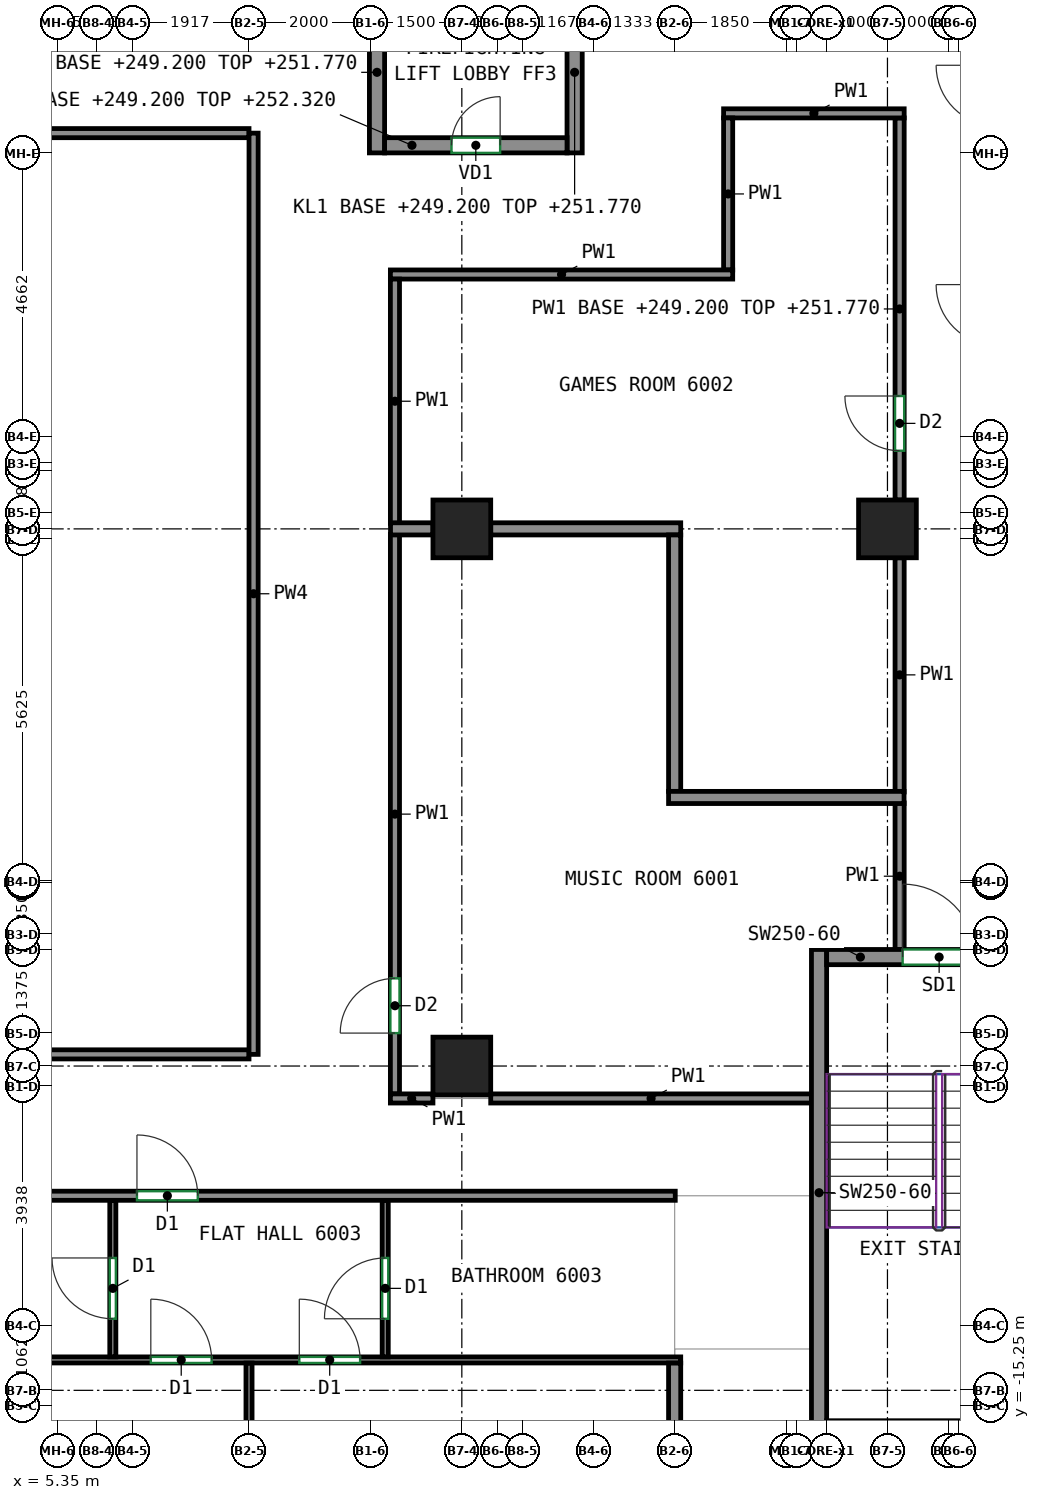
"""IFC4 building model, lengths in metres.
Left out: names, types, materials, properties, quantities, classifications, styles, units other than length and angle.
Written with IfcOpenShell. Run it as: python <this file> out.ifc"""

import sys

from ifc_helpers import new_model, si_unit, direction, frame, frame_2d, origin, origin_2d, place, context, subcontext, project, spatial, rectangle, extrude, source, transform, mapped, element, fill, save


model = new_model("IFC4")
c1 = context("Model", 3, precision=1e-05, world=origin(), true_north=direction((0.0, 1.0)))
c2 = subcontext(c1, "Body", "Model", "MODEL_VIEW")
j1 = project(units=[si_unit("LENGTHUNIT", "METRE"), si_unit("PLANEANGLEUNIT", "RADIAN")], contexts=[c1])
p1 = place(None, origin())
s1 = spatial("IfcSite", under=j1, at=p1, CompositionType="ELEMENT")
p2 = place(p1, origin())
s2 = spatial("IfcBuilding", under=s1, at=p2, CompositionType="ELEMENT")
p3 = place(p2, frame((0.0, 0.0, 249.2)))
s3 = spatial("IfcBuildingStorey", under=s2, at=p3, CompositionType="ELEMENT", Elevation=249.2)
m1 = source(origin(), c2, "Body", "SweptSolid", [
    extrude(rectangle(XDim=0.95, YDim=0.95, at=origin_2d()), origin(), (0.0, 0.0, 1.0), 3.12),
])
for number, where, z_axis, x_axis in (
    (1, (12.0, -9.667, 0.0), (0.0, 0.0, 1.0), (1.0, 0.0, 0.0)),
    (2, (12.0, -0.833, 0.0), (0.0, 0.0, 1.0), (1.0, 0.0, 0.0)),
    (3, (19.0, -0.833, 0.0), (0.0, 0.0, 1.0), (1.0, 0.0, 0.0)),
):
    element("IfcColumn", number, at=place(p3, frame(where, z_axis=z_axis, x_axis=x_axis)), inside=s3, PredefinedType="COLUMN", context=c2, shape_type="MappedRepresentation", body=[
        mapped(m1, transform((0.0, 0.0, 0.0))),
    ])
m2 = source(origin(), c2, "Body", "SweptSolid", [
    extrude(rectangle(XDim=8.0, YDim=0.25, at=frame_2d((4.0, 0.0))), origin(), (0.0, 0.0, 1.0), 3.12),
])
p4 = place(p3, frame((17.875, -15.75, 0.0), z_axis=(0.0, 0.0, 1.0), x_axis=(0.0, 1.0, 0.0)))
e4 = element("IfcWall", 4, at=p4, inside=s3, PredefinedType="SHEAR", context=c2, shape_type="MappedRepresentation", body=[
    mapped(m2, transform((0.0, 0.0, 0.0))),
])
m3 = source(origin(), c2, "Body", "SweptSolid", [
    extrude(rectangle(XDim=3.7, YDim=0.25, at=frame_2d((1.85, 0.0))), origin(), (0.0, 0.0, 1.0), 3.12),
])
p5 = place(p3, frame((18.0, -7.875, 0.0), z_axis=(0.0, 0.0, 1.0), x_axis=(1.0, 0.0, 0.0)))
e5 = element("IfcWall", 5, at=p5, inside=s3, PredefinedType="SHEAR", context=c2, shape_type="MappedRepresentation", body=[
    mapped(m3, transform((0.0, 0.0, 0.0))),
])
p6 = place(p5, frame((1.25, 0.0, 0.0)))
e6 = element("IfcOpeningElement", 6, at=p6, cuts=e5, PredefinedType="OPENING", context=c2, shape_type="SweptSolid", body=[
    extrude(rectangle(XDim=1.2, YDim=2.1, at=frame_2d((0.6, 1.05))), frame((0.0, 0.135, 0.0), z_axis=(0.0, -1.0, 0.0), x_axis=(1.0, 0.0, 0.0)), (0.0, 0.0, 1.0), 0.27),
])
m4 = source(origin(), c2, "Body", "SweptSolid", [
    extrude(rectangle(XDim=2.65, YDim=0.25, at=frame_2d((1.325, 0.0))), origin(), (0.0, 0.0, 1.0), 2.57),
])
for number, where, z_axis, x_axis in (
    (7, (10.605, 5.35, 0.0), (0.0, 0.0, 1.0), (0.0, 1.0, 0.0)),
    (8, (13.855, 5.35, 0.0), (0.0, 0.0, 1.0), (0.0, 1.0, 0.0)),
):
    element("IfcWall", number, at=place(p3, frame(where, z_axis=z_axis, x_axis=x_axis)), inside=s3, PredefinedType="PARTITIONING", context=c2, shape_type="MappedRepresentation", body=[
        mapped(m4, transform((0.0, 0.0, 0.0))),
    ])
m5 = source(origin(), c2, "Body", "SweptSolid", [
    extrude(rectangle(XDim=3.0, YDim=0.25, at=frame_2d((1.5, 0.0))), origin(), (0.0, 0.0, 1.0), 3.12),
])
p7 = place(p3, frame((10.73, 5.475, 0.0), z_axis=(0.0, 0.0, 1.0), x_axis=(1.0, 0.0, 0.0)))
e9 = element("IfcWall", 9, at=p7, inside=s3, PredefinedType="PARTITIONING", context=c2, shape_type="MappedRepresentation", body=[
    mapped(m5, transform((0.0, 0.0, 0.0))),
])
p8 = place(p7, frame((1.1, 0.0, 0.0)))
e10 = element("IfcOpeningElement", 10, at=p8, cuts=e9, PredefinedType="OPENING", context=c2, shape_type="SweptSolid", body=[
    extrude(rectangle(XDim=0.8, YDim=2.0, at=frame_2d((0.4, 1.0))), frame((0.0, 0.135, 0.0), z_axis=(0.0, -1.0, 0.0), x_axis=(1.0, 0.0, 0.0)), (0.0, 0.0, 1.0), 0.27),
])
p9 = place(p3, frame((-11.8, -11.8, 0.0), z_axis=(0.0, 0.0, 1.0), x_axis=(1.0, 0.0, 0.0)))
e11 = element("IfcWall", 11, at=p9, inside=s3, PredefinedType="PARTITIONING", context=c2, shape_type="SweptSolid", body=[
    extrude(rectangle(XDim=27.31, YDim=0.15, at=frame_2d((13.655, 0.0))), origin(), (0.0, 0.0, 1.0), 3.12),
])
p10 = place(p9, frame((5.021, 0.0, 0.0)))
e12 = element("IfcOpeningElement", 12, at=p10, cuts=e11, PredefinedType="OPENING", context=c2, shape_type="SweptSolid", body=[
    extrude(rectangle(XDim=1.0, YDim=2.1, at=frame_2d((0.5, 1.05))), frame((0.0, 0.085, 0.0), z_axis=(0.0, -1.0, 0.0), x_axis=(1.0, 0.0, 0.0)), (0.0, 0.0, 1.0), 0.17),
])
p11 = place(p9, frame((18.457, 0.0, 0.0)))
e13 = element("IfcOpeningElement", 13, at=p11, cuts=e11, PredefinedType="OPENING", context=c2, shape_type="SweptSolid", body=[
    extrude(rectangle(XDim=1.0, YDim=2.1, at=frame_2d((0.5, 1.05))), frame((0.0, 0.085, 0.0), z_axis=(0.0, -1.0, 0.0), x_axis=(1.0, 0.0, 0.0)), (0.0, 0.0, 1.0), 0.17),
])
p12 = place(p3, frame((19.2, -7.75, 0.0), z_axis=(0.0, 0.0, 1.0), x_axis=(0.0, 1.0, 0.0)))
e14 = element("IfcWall", 14, at=p12, inside=s3, PredefinedType="PARTITIONING", context=c2, shape_type="SweptSolid", body=[
    extrude(rectangle(XDim=2.41, YDim=0.15, at=frame_2d((1.205, 0.0))), origin(), (0.0, 0.0, 1.0), 3.12),
])
p13 = place(p3, frame((10.9, -10.125, 0.0), z_axis=(0.0, 0.0, 1.0), x_axis=(0.0, 1.0, 0.0)))
e15 = element("IfcWall", 15, at=p13, inside=s3, PredefinedType="PARTITIONING", context=c2, shape_type="SweptSolid", body=[
    extrude(rectangle(XDim=9.202, YDim=0.15, at=frame_2d((4.601, 0.0))), origin(), (0.0, 0.0, 1.0), 3.12),
])
p14 = place(p13, frame((1.0, 0.0, 0.0)))
e16 = element("IfcOpeningElement", 16, at=p14, cuts=e15, PredefinedType="OPENING", context=c2, shape_type="SweptSolid", body=[
    extrude(rectangle(XDim=0.9, YDim=2.1, at=frame_2d((0.45, 1.05))), frame((0.0, 0.085, 0.0), z_axis=(0.0, -1.0, 0.0), x_axis=(1.0, 0.0, 0.0)), (0.0, 0.0, 1.0), 0.17),
])
p15 = place(p3, frame((12.475, -10.2, 0.0), z_axis=(0.0, 0.0, 1.0), x_axis=(1.0, 0.0, 0.0)))
e17 = element("IfcWall", 17, at=p15, inside=s3, PredefinedType="PARTITIONING", context=c2, shape_type="SweptSolid", body=[
    extrude(rectangle(XDim=5.275, YDim=0.15, at=frame_2d((2.637, 0.0))), origin(), (0.0, 0.0, 1.0), 3.12),
])
p16 = place(p3, frame((10.825, -10.2, 0.0), z_axis=(0.0, 0.0, 1.0), x_axis=(1.0, 0.0, 0.0)))
e18 = element("IfcWall", 18, at=p16, inside=s3, PredefinedType="PARTITIONING", context=c2, shape_type="SweptSolid", body=[
    extrude(rectangle(XDim=0.7, YDim=0.15, at=frame_2d((0.35, 0.0))), origin(), (0.0, 0.0, 1.0), 3.12),
])
p17 = place(p3, frame((19.2, -5.16, 0.0), z_axis=(0.0, 0.0, 1.0), x_axis=(0.0, 1.0, 0.0)))
e19 = element("IfcWall", 19, at=p17, inside=s3, PredefinedType="PARTITIONING", context=c2, shape_type="SweptSolid", body=[
    extrude(rectangle(XDim=3.852, YDim=0.15, at=frame_2d((1.926, 0.0))), origin(), (0.0, 0.0, 1.0), 3.12),
])
p18 = place(p3, frame((19.2, -0.358, 0.0), z_axis=(0.0, 0.0, 1.0), x_axis=(0.0, 1.0, 0.0)))
e20 = element("IfcWall", 20, at=p18, inside=s3, PredefinedType="PARTITIONING", context=c2, shape_type="SweptSolid", body=[
    extrude(rectangle(XDim=6.283, YDim=0.15, at=frame_2d((3.142, 0.0))), origin(), (0.0, 0.0, 1.0), 2.57),
])
p19 = place(p18, frame((0.81, 0.0, 0.0)))
e21 = element("IfcOpeningElement", 21, at=p19, cuts=e20, PredefinedType="OPENING", context=c2, shape_type="SweptSolid", body=[
    extrude(rectangle(XDim=0.9, YDim=2.1, at=frame_2d((0.45, 1.05))), frame((0.0, 0.085, 0.0), z_axis=(0.0, -1.0, 0.0), x_axis=(1.0, 0.0, 0.0)), (0.0, 0.0, 1.0), 0.17),
])
p20 = place(p3, frame((16.305, 6.0, 0.0), z_axis=(0.0, 0.0, 1.0), x_axis=(1.0, 0.0, 0.0)))
e22 = element("IfcWall", 22, at=p20, inside=s3, PredefinedType="PARTITIONING", context=c2, shape_type="SweptSolid", body=[
    extrude(rectangle(XDim=2.97, YDim=0.15, at=frame_2d((1.485, 0.0))), origin(), (0.0, 0.0, 1.0), 3.12),
])
p21 = place(p3, frame((16.38, 3.425, 0.0), z_axis=(0.0, 0.0, 1.0), x_axis=(0.0, 1.0, 0.0)))
e23 = element("IfcWall", 23, at=p21, inside=s3, PredefinedType="PARTITIONING", context=c2, shape_type="SweptSolid", body=[
    extrude(rectangle(XDim=2.5, YDim=0.15, at=frame_2d((1.25, 0.0))), origin(), (0.0, 0.0, 1.0), 3.12),
])
p22 = place(p3, frame((10.825, 3.35, 0.0), z_axis=(0.0, 0.0, 1.0), x_axis=(1.0, 0.0, 0.0)))
e24 = element("IfcWall", 24, at=p22, inside=s3, PredefinedType="PARTITIONING", context=c2, shape_type="SweptSolid", body=[
    extrude(rectangle(XDim=5.63, YDim=0.15, at=frame_2d((2.815, 0.0))), origin(), (0.0, 0.0, 1.0), 3.12),
])
p23 = place(p3, frame((10.9, -0.743, 0.0), z_axis=(0.0, 0.0, 1.0), x_axis=(0.0, 1.0, 0.0)))
e25 = element("IfcWall", 25, at=p23, inside=s3, PredefinedType="PARTITIONING", context=c2, shape_type="SweptSolid", body=[
    extrude(rectangle(XDim=4.018, YDim=0.15, at=frame_2d((2.009, 0.0))), origin(), (0.0, 0.0, 1.0), 3.12),
])
p24 = place(p3, frame((-9.06, -14.5, 0.0), z_axis=(0.0, 0.0, 1.0), x_axis=(1.0, 0.0, 0.0)))
e26 = element("IfcWall", 26, at=p24, inside=s3, PredefinedType="PARTITIONING", context=c2, shape_type="SweptSolid", body=[
    extrude(rectangle(XDim=24.66, YDim=0.1, at=frame_2d((12.33, 0.0))), origin(), (0.0, 0.0, 1.0), 3.12),
])
p25 = place(p24, frame((0.924, 0.0, 0.0)))
e27 = element("IfcOpeningElement", 27, at=p25, cuts=e26, PredefinedType="OPENING", context=c2, shape_type="SweptSolid", body=[
    extrude(rectangle(XDim=1.0, YDim=2.1, at=frame_2d((0.5, 1.05))), frame((0.0, 0.06, 0.0), z_axis=(0.0, -1.0, 0.0), x_axis=(1.0, 0.0, 0.0)), (0.0, 0.0, 1.0), 0.12),
])
p26 = place(p24, frame((15.945, 0.0, 0.0)))
e28 = element("IfcOpeningElement", 28, at=p26, cuts=e26, PredefinedType="OPENING", context=c2, shape_type="SweptSolid", body=[
    extrude(rectangle(XDim=1.0, YDim=2.1, at=frame_2d((0.5, 1.05))), frame((0.0, 0.06, 0.0), z_axis=(0.0, -1.0, 0.0), x_axis=(1.0, 0.0, 0.0)), (0.0, 0.0, 1.0), 0.12),
])
p27 = place(p24, frame((18.387, 0.0, 0.0)))
e29 = element("IfcOpeningElement", 29, at=p27, cuts=e26, PredefinedType="OPENING", context=c2, shape_type="SweptSolid", body=[
    extrude(rectangle(XDim=1.0, YDim=2.1, at=frame_2d((0.5, 1.05))), frame((0.0, 0.06, 0.0), z_axis=(0.0, -1.0, 0.0), x_axis=(1.0, 0.0, 0.0)), (0.0, 0.0, 1.0), 0.12),
])
p28 = place(p3, frame((6.26, -14.45, 0.0), z_axis=(0.0, 0.0, 1.0), x_axis=(0.0, 1.0, 0.0)))
e30 = element("IfcWall", 30, at=p28, inside=s3, PredefinedType="PARTITIONING", context=c2, shape_type="SweptSolid", body=[
    extrude(rectangle(XDim=2.573, YDim=0.1, at=frame_2d((1.287, 0.0))), origin(), (0.0, 0.0, 1.0), 3.12),
])
p29 = place(p28, frame((0.627, 0.0, 0.0)))
e31 = element("IfcOpeningElement", 31, at=p29, cuts=e30, PredefinedType="OPENING", context=c2, shape_type="SweptSolid", body=[
    extrude(rectangle(XDim=1.0, YDim=2.1, at=frame_2d((0.5, 1.05))), frame((0.0, 0.06, 0.0), z_axis=(0.0, -1.0, 0.0), x_axis=(1.0, 0.0, 0.0)), (0.0, 0.0, 1.0), 0.12),
])
p30 = place(p3, frame((10.74, -14.45, 0.0), z_axis=(0.0, 0.0, 1.0), x_axis=(0.0, 1.0, 0.0)))
e32 = element("IfcWall", 32, at=p30, inside=s3, PredefinedType="PARTITIONING", context=c2, shape_type="SweptSolid", body=[
    extrude(rectangle(XDim=2.573, YDim=0.1, at=frame_2d((1.287, 0.0))), origin(), (0.0, 0.0, 1.0), 3.12),
])
p31 = place(p30, frame((0.627, 0.0, 0.0)))
e33 = element("IfcOpeningElement", 33, at=p31, cuts=e32, PredefinedType="OPENING", context=c2, shape_type="SweptSolid", body=[
    extrude(rectangle(XDim=1.0, YDim=2.1, at=frame_2d((0.5, 1.05))), frame((0.0, 0.06, 0.0), z_axis=(0.0, -1.0, 0.0), x_axis=(1.0, 0.0, 0.0)), (0.0, 0.0, 1.0), 0.12),
])
p32 = place(p3, frame((8.5, -18.25, 0.0), z_axis=(0.0, 0.0, 1.0), x_axis=(0.0, 1.0, 0.0)))
e34 = element("IfcWall", 34, at=p32, inside=s3, PredefinedType="PARTITIONING", context=c2, shape_type="SweptSolid", body=[
    extrude(rectangle(XDim=3.698, YDim=0.1, at=frame_2d((1.849, 0.0))), origin(), (0.0, 0.0, 1.0), 3.12),
])
p33 = place(p3, frame((15.5, -15.59, 0.0), z_axis=(0.0, 0.0, 1.0), x_axis=(0.0, 1.0, 0.0)))
e35 = element("IfcWall", 35, at=p33, inside=s3, PredefinedType="PARTITIONING", context=c2, shape_type="SweptSolid", body=[
    extrude(rectangle(XDim=1.038, YDim=0.2, at=frame_2d((0.519, 0.0))), origin(), (0.0, 0.0, 1.0), 3.12),
])
p34 = place(p3, frame((10.827, -0.833, 0.0), z_axis=(0.0, 0.0, 1.0), x_axis=(1.0, 0.0, 0.0)))
e36 = element("IfcWall", 36, at=p34, inside=s3, PredefinedType="PARTITIONING", context=c2, shape_type="SweptSolid", body=[
    extrude(rectangle(XDim=0.698, YDim=0.2, at=frame_2d((0.349, 0.0))), origin(), (0.0, 0.0, 1.0), 3.12),
])
p35 = place(p3, frame((12.475, -0.833, 0.0), z_axis=(0.0, 0.0, 1.0), x_axis=(1.0, 0.0, 0.0)))
e37 = element("IfcWall", 37, at=p35, inside=s3, PredefinedType="PARTITIONING", context=c2, shape_type="SweptSolid", body=[
    extrude(rectangle(XDim=3.125, YDim=0.2, at=frame_2d((1.562, 0.0))), origin(), (0.0, 0.0, 1.0), 3.12),
])
p36 = place(p3, frame((15.5, -5.15, 0.0), z_axis=(0.0, 0.0, 1.0), x_axis=(0.0, 1.0, 0.0)))
e38 = element("IfcWall", 38, at=p36, inside=s3, PredefinedType="PARTITIONING", context=c2, shape_type="SweptSolid", body=[
    extrude(rectangle(XDim=4.217, YDim=0.2, at=frame_2d((2.108, 0.0))), origin(), (0.0, 0.0, 1.0), 3.12),
])
p37 = place(p3, frame((15.4, -5.25, 0.0), z_axis=(0.0, 0.0, 1.0), x_axis=(1.0, 0.0, 0.0)))
e39 = element("IfcWall", 39, at=p37, inside=s3, PredefinedType="PARTITIONING", context=c2, shape_type="SweptSolid", body=[
    extrude(rectangle(XDim=3.873, YDim=0.2, at=frame_2d((1.937, 0.0))), origin(), (0.0, 0.0, 1.0), 3.12),
])
for number, where, z_axis, x_axis in (
    (40, (8.5, -9.475, 0.0), (0.0, 0.0, 1.0), (-1.0, 0.0, 0.0)),
    (41, (-6.575, 5.675, 0.0), (0.0, 0.0, 1.0), (1.0, 0.0, 0.0)),
):
    element("IfcWall", number, at=place(p3, frame(where, z_axis=z_axis, x_axis=x_axis)), inside=s3, PredefinedType="PARTITIONING", context=c2, shape_type="SweptSolid", body=[
        extrude(rectangle(XDim=15.075, YDim=0.15, at=frame_2d((7.538, 0.0))), origin(), (0.0, 0.0, 1.0), 3.12),
    ])
p38 = place(p3, frame((8.575, 5.675, 0.0), z_axis=(0.0, 0.0, 1.0), x_axis=(0.0, -1.0, 0.0)))
e42 = element("IfcWall", 42, at=p38, inside=s3, PredefinedType="PARTITIONING", context=c2, shape_type="SweptSolid", body=[
    extrude(rectangle(XDim=15.15, YDim=0.15, at=frame_2d((7.575, 0.0))), origin(), (0.0, 0.0, 1.0), 3.12),
])
p39 = place(p8, origin())
e43 = element("IfcDoor", 43, at=p39, inside=s3, OperationType="SINGLE_SWING_RIGHT", PredefinedType="DOOR", context=c2, shape_type="SweptSolid", body=[
    extrude(rectangle(XDim=0.8, YDim=2.0, at=frame_2d((0.4, 1.0))), frame((0.0, 0.025, 0.0), z_axis=(0.0, -1.0, 0.0), x_axis=(1.0, 0.0, 0.0)), (0.0, 0.0, 1.0), 0.05),
])
fill(e10, e43)
p40 = place(p6, origin())
e44 = element("IfcDoor", 44, at=p40, inside=s3, OperationType="DOUBLE_DOOR_SINGLE_SWING", PredefinedType="DOOR", context=c2, shape_type="SweptSolid", body=[
    extrude(rectangle(XDim=1.2, YDim=2.1, at=frame_2d((0.6, 1.05))), frame((0.0, 0.025, 0.0), z_axis=(0.0, -1.0, 0.0), x_axis=(1.0, 0.0, 0.0)), (0.0, 0.0, 1.0), 0.05),
])
fill(e6, e44)
p41 = place(p26, origin())
e45 = element("IfcDoor", 45, at=p41, inside=s3, OperationType="SINGLE_SWING_LEFT", PredefinedType="DOOR", context=c2, shape_type="SweptSolid", body=[
    extrude(rectangle(XDim=1.0, YDim=2.1, at=frame_2d((0.5, 1.05))), frame((0.0, 0.025, 0.0), z_axis=(0.0, -1.0, 0.0), x_axis=(1.0, 0.0, 0.0)), (0.0, 0.0, 1.0), 0.05),
])
fill(e28, e45)
p42 = place(p27, origin())
e46 = element("IfcDoor", 46, at=p42, inside=s3, OperationType="SINGLE_SWING_LEFT", PredefinedType="DOOR", context=c2, shape_type="SweptSolid", body=[
    extrude(rectangle(XDim=1.0, YDim=2.1, at=frame_2d((0.5, 1.05))), frame((0.0, 0.025, 0.0), z_axis=(0.0, -1.0, 0.0), x_axis=(1.0, 0.0, 0.0)), (0.0, 0.0, 1.0), 0.05),
])
fill(e29, e46)
p43 = place(p29, origin())
e47 = element("IfcDoor", 47, at=p43, inside=s3, OperationType="SINGLE_SWING_RIGHT", PredefinedType="DOOR", context=c2, shape_type="SweptSolid", body=[
    extrude(rectangle(XDim=1.0, YDim=2.1, at=frame_2d((0.5, 1.05))), frame((0.0, 0.025, 0.0), z_axis=(0.0, -1.0, 0.0), x_axis=(1.0, 0.0, 0.0)), (0.0, 0.0, 1.0), 0.05),
])
fill(e31, e47)
p44 = place(p31, origin())
e48 = element("IfcDoor", 48, at=p44, inside=s3, OperationType="SINGLE_SWING_LEFT", PredefinedType="DOOR", context=c2, shape_type="SweptSolid", body=[
    extrude(rectangle(XDim=1.0, YDim=2.1, at=frame_2d((0.5, 1.05))), frame((0.0, 0.025, 0.0), z_axis=(0.0, -1.0, 0.0), x_axis=(1.0, 0.0, 0.0)), (0.0, 0.0, 1.0), 0.05),
])
fill(e33, e48)
p45 = place(p11, origin())
e49 = element("IfcDoor", 49, at=p45, inside=s3, OperationType="SINGLE_SWING_LEFT", PredefinedType="DOOR", context=c2, shape_type="SweptSolid", body=[
    extrude(rectangle(XDim=1.0, YDim=2.1, at=frame_2d((0.5, 1.05))), frame((0.0, 0.025, 0.0), z_axis=(0.0, -1.0, 0.0), x_axis=(1.0, 0.0, 0.0)), (0.0, 0.0, 1.0), 0.05),
])
fill(e13, e49)
p46 = place(p14, origin())
e50 = element("IfcDoor", 50, at=p46, inside=s3, OperationType="SINGLE_SWING_LEFT", PredefinedType="DOOR", context=c2, shape_type="SweptSolid", body=[
    extrude(rectangle(XDim=0.9, YDim=2.1, at=frame_2d((0.45, 1.05))), frame((0.0, 0.025, 0.0), z_axis=(0.0, -1.0, 0.0), x_axis=(1.0, 0.0, 0.0)), (0.0, 0.0, 1.0), 0.05),
])
fill(e16, e50)
p47 = place(p19, origin())
e51 = element("IfcDoor", 51, at=p47, inside=s3, OperationType="SINGLE_SWING_RIGHT", PredefinedType="DOOR", context=c2, shape_type="SweptSolid", body=[
    extrude(rectangle(XDim=0.9, YDim=2.1, at=frame_2d((0.45, 1.05))), frame((0.0, 0.025, 0.0), z_axis=(0.0, -1.0, 0.0), x_axis=(1.0, 0.0, 0.0)), (0.0, 0.0, 1.0), 0.05),
])
fill(e21, e51)
save(model, sys.argv[1])
